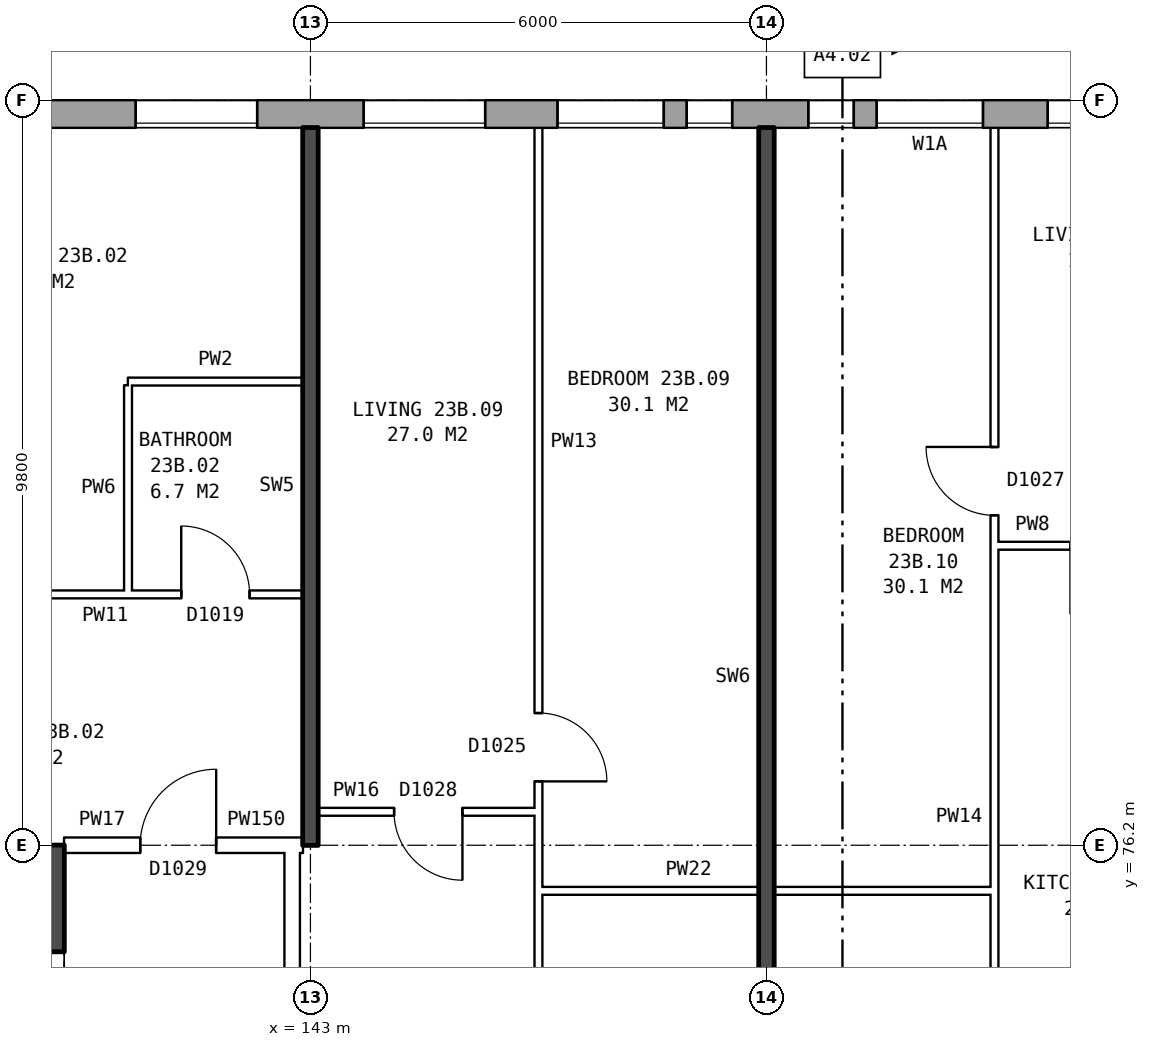
"""IFC4 building model, lengths in metres.
Left out: names, types, materials, properties, quantities, classifications, styles, units other than length and angle.
Written with IfcOpenShell. Run it as: python <this file> out.ifc"""

import sys

from ifc_helpers import new_model, si_unit, direction, frame, frame_2d, origin, place, context, subcontext, project, spatial, rectangle, extrude, element, fill, save


model = new_model("IFC4")
c1 = context("Model", 3, precision=1e-05, world=origin(), true_north=direction((0.0, 1.0)))
c2 = subcontext(c1, "Body", "Model", "MODEL_VIEW")
j1 = project(units=[si_unit("LENGTHUNIT", "METRE"), si_unit("PLANEANGLEUNIT", "RADIAN")], contexts=[c1])
p1 = place(None, origin())
s1 = spatial("IfcSite", under=j1, at=p1, CompositionType="ELEMENT")
p2 = place(p1, origin())
s2 = spatial("IfcBuilding", under=s1, at=p2, CompositionType="ELEMENT")
p3 = place(p2, frame((0.0, 0.0, 84.0)))
s3 = spatial("IfcBuildingStorey", under=s2, at=p3, CompositionType="ELEMENT", Elevation=84.0)
p4 = place(p3, frame((172.175, 85.82, 0.0), z_axis=(0.0, 0.0, 1.0), x_axis=(-1.0, 0.0, 0.0)))
e1 = element("IfcWall", 1, at=p4, inside=s3, PredefinedType="STANDARD", context=c2, shape_type="SweptSolid", body=[
    extrude(rectangle(XDim=38.101, YDim=0.36, at=frame_2d((19.05, 0.0))), origin(), (0.0, 0.0, 1.0), 2.85),
])
p5 = place(p4, frame((2.875, 0.0, 0.8)))
e2 = element("IfcOpeningElement", 2, at=p5, cuts=e1, PredefinedType="OPENING", context=c2, shape_type="SweptSolid", body=[
    extrude(rectangle(XDim=1.6, YDim=1.8, at=frame_2d((0.8, 0.9))), frame((0.0, 0.19, 0.0), z_axis=(0.0, -1.0, 0.0), x_axis=(1.0, 0.0, 0.0)), (0.0, 0.0, 1.0), 0.38),
])
p6 = place(p4, frame((5.875, 0.0, 0.8)))
e3 = element("IfcOpeningElement", 3, at=p6, cuts=e1, PredefinedType="OPENING", context=c2, shape_type="SweptSolid", body=[
    extrude(rectangle(XDim=1.6, YDim=1.8, at=frame_2d((0.8, 0.9))), frame((0.0, 0.19, 0.0), z_axis=(0.0, -1.0, 0.0), x_axis=(1.0, 0.0, 0.0)), (0.0, 0.0, 1.0), 0.38),
])
p7 = place(p4, frame((8.875, 0.0, 0.8)))
e4 = element("IfcOpeningElement", 4, at=p7, cuts=e1, PredefinedType="OPENING", context=c2, shape_type="SweptSolid", body=[
    extrude(rectangle(XDim=1.6, YDim=1.8, at=frame_2d((0.8, 0.9))), frame((0.0, 0.19, 0.0), z_axis=(0.0, -1.0, 0.0), x_axis=(1.0, 0.0, 0.0)), (0.0, 0.0, 1.0), 0.38),
])
p8 = place(p4, frame((11.875, 0.0, 0.8)))
e5 = element("IfcOpeningElement", 5, at=p8, cuts=e1, PredefinedType="OPENING", context=c2, shape_type="SweptSolid", body=[
    extrude(rectangle(XDim=1.6, YDim=1.8, at=frame_2d((0.8, 0.9))), frame((0.0, 0.19, 0.0), z_axis=(0.0, -1.0, 0.0), x_axis=(1.0, 0.0, 0.0)), (0.0, 0.0, 1.0), 0.38),
])
p9 = place(p4, frame((13.775, 0.0, 1.6)))
e6 = element("IfcOpeningElement", 6, at=p9, cuts=e1, PredefinedType="OPENING", context=c2, shape_type="SweptSolid", body=[
    extrude(rectangle(XDim=0.6, YDim=0.9, at=frame_2d((0.3, 0.45))), frame((0.0, 0.19, 0.0), z_axis=(0.0, -1.0, 0.0), x_axis=(1.0, 0.0, 0.0)), (0.0, 0.0, 1.0), 0.38),
])
p10 = place(p4, frame((17.875, 0.0, 0.8)))
e7 = element("IfcOpeningElement", 7, at=p10, cuts=e1, PredefinedType="OPENING", context=c2, shape_type="SweptSolid", body=[
    extrude(rectangle(XDim=1.6, YDim=1.8, at=frame_2d((0.8, 0.9))), frame((0.0, 0.19, 0.0), z_axis=(0.0, -1.0, 0.0), x_axis=(1.0, 0.0, 0.0)), (0.0, 0.0, 1.0), 0.38),
])
p11 = place(p4, frame((20.325, 0.0, 0.65)))
e8 = element("IfcOpeningElement", 8, at=p11, cuts=e1, PredefinedType="OPENING", context=c2, shape_type="SweptSolid", body=[
    extrude(rectangle(XDim=1.4, YDim=1.8, at=frame_2d((0.7, 0.9))), frame((0.0, 0.19, 0.0), z_axis=(0.0, -1.0, 0.0), x_axis=(1.0, 0.0, 0.0)), (0.0, 0.0, 1.0), 0.38),
])
p12 = place(p4, frame((23.625, 0.0, 1.7)))
e9 = element("IfcOpeningElement", 9, at=p12, cuts=e1, PredefinedType="OPENING", context=c2, shape_type="SweptSolid", body=[
    extrude(rectangle(XDim=0.6, YDim=0.9, at=frame_2d((0.3, 0.45))), frame((0.0, 0.19, 0.0), z_axis=(0.0, -1.0, 0.0), x_axis=(1.0, 0.0, 0.0)), (0.0, 0.0, 1.0), 0.38),
])
p13 = place(p4, frame((26.875, 0.0, 0.8)))
e10 = element("IfcOpeningElement", 10, at=p13, cuts=e1, PredefinedType="OPENING", context=c2, shape_type="SweptSolid", body=[
    extrude(rectangle(XDim=1.6, YDim=1.8, at=frame_2d((0.8, 0.9))), frame((0.0, 0.19, 0.0), z_axis=(0.0, -1.0, 0.0), x_axis=(1.0, 0.0, 0.0)), (0.0, 0.0, 1.0), 0.38),
])
p14 = place(p4, frame((29.875, 0.0, 0.8)))
e11 = element("IfcOpeningElement", 11, at=p14, cuts=e1, PredefinedType="OPENING", context=c2, shape_type="SweptSolid", body=[
    extrude(rectangle(XDim=1.6, YDim=1.8, at=frame_2d((0.8, 0.9))), frame((0.0, 0.19, 0.0), z_axis=(0.0, -1.0, 0.0), x_axis=(1.0, 0.0, 0.0)), (0.0, 0.0, 1.0), 0.38),
])
p15 = place(p4, frame((32.875, 0.0, 0.8)))
e12 = element("IfcOpeningElement", 12, at=p15, cuts=e1, PredefinedType="OPENING", context=c2, shape_type="SweptSolid", body=[
    extrude(rectangle(XDim=1.6, YDim=1.8, at=frame_2d((0.8, 0.9))), frame((0.0, 0.19, 0.0), z_axis=(0.0, -1.0, 0.0), x_axis=(1.0, 0.0, 0.0)), (0.0, 0.0, 1.0), 0.38),
])
p16 = place(p4, frame((35.875, 0.0, 0.8)))
e13 = element("IfcOpeningElement", 13, at=p16, cuts=e1, PredefinedType="OPENING", context=c2, shape_type="SweptSolid", body=[
    extrude(rectangle(XDim=1.6, YDim=1.8, at=frame_2d((0.8, 0.9))), frame((0.0, 0.19, 0.0), z_axis=(0.0, -1.0, 0.0), x_axis=(1.0, 0.0, 0.0)), (0.0, 0.0, 1.0), 0.38),
])
p17 = place(p4, frame((15.925, 0.0, 0.8)))
e14 = element("IfcOpeningElement", 14, at=p17, cuts=e1, PredefinedType="OPENING", context=c2, shape_type="SweptSolid", body=[
    extrude(rectangle(XDim=1.0, YDim=1.2, at=frame_2d((0.5, 0.6))), frame((0.0, 0.19, 0.0), z_axis=(0.0, -1.0, 0.0), x_axis=(1.0, 0.0, 0.0)), (0.0, 0.0, 1.0), 0.38),
])
p18 = place(p4, frame((22.025, 0.0, 0.65)))
e15 = element("IfcOpeningElement", 15, at=p18, cuts=e1, PredefinedType="OPENING", context=c2, shape_type="SweptSolid", body=[
    extrude(rectangle(XDim=0.6, YDim=0.9, at=frame_2d((0.3, 0.45))), frame((0.0, 0.19, 0.0), z_axis=(0.0, -1.0, 0.0), x_axis=(1.0, 0.0, 0.0)), (0.0, 0.0, 1.0), 0.38),
])
p19 = place(p4, frame((24.525, 0.0, 0.8)))
e16 = element("IfcOpeningElement", 16, at=p19, cuts=e1, PredefinedType="OPENING", context=c2, shape_type="SweptSolid", body=[
    extrude(rectangle(XDim=1.4, YDim=1.8, at=frame_2d((0.7, 0.9))), frame((0.0, 0.19, 0.0), z_axis=(0.0, -1.0, 0.0), x_axis=(1.0, 0.0, 0.0)), (0.0, 0.0, 1.0), 0.38),
])
p20 = place(p3, frame((139.41, 64.5, 0.0), z_axis=(0.0, 0.0, 1.0), x_axis=(0.0, 1.0, 0.0)))
e17 = element("IfcWall", 17, at=p20, inside=s3, PredefinedType="SHEAR", context=c2, shape_type="SweptSolid", body=[
    extrude(rectangle(XDim=11.0, YDim=0.7, at=frame_2d((5.5, 0.0))), origin(), (0.0, 0.0, 1.0), 2.85),
])
p21 = place(p20, frame((0.625, 0.0, 0.0)))
e18 = element("IfcOpeningElement", 18, at=p21, cuts=e17, PredefinedType="OPENING", context=c2, shape_type="SweptSolid", body=[
    extrude(rectangle(XDim=1.1, YDim=2.1, at=frame_2d((0.55, 1.05))), frame((0.0, 0.36, 0.0), z_axis=(0.0, -1.0, 0.0), x_axis=(1.0, 0.0, 0.0)), (0.0, 0.0, 1.0), 0.72),
])
p22 = place(p20, frame((9.2, 0.0, 0.0)))
e19 = element("IfcOpeningElement", 19, at=p22, cuts=e17, PredefinedType="OPENING", context=c2, shape_type="SweptSolid", body=[
    extrude(rectangle(XDim=1.1, YDim=2.1, at=frame_2d((0.55, 1.05))), frame((0.0, 0.36, 0.0), z_axis=(0.0, -1.0, 0.0), x_axis=(1.0, 0.0, 0.0)), (0.0, 0.0, 1.0), 0.72),
])
p23 = place(p20, frame((7.425, 0.0, 0.0)))
e20 = element("IfcOpeningElement", 20, at=p23, cuts=e17, PredefinedType="OPENING", context=c2, shape_type="SweptSolid", body=[
    extrude(rectangle(XDim=0.85, YDim=2.1, at=frame_2d((0.425, 1.05))), frame((0.0, 0.36, 0.0), z_axis=(0.0, -1.0, 0.0), x_axis=(1.0, 0.0, 0.0)), (0.0, 0.0, 1.0), 0.72),
])
p24 = place(p3, frame((139.76, 75.85, 0.0), z_axis=(0.0, 0.0, 1.0), x_axis=(-1.0, 0.0, 0.0)))
e21 = element("IfcWall", 21, at=p24, inside=s3, PredefinedType="SHEAR", context=c2, shape_type="SweptSolid", body=[
    extrude(rectangle(XDim=8.4, YDim=0.7, at=frame_2d((4.2, 0.0))), origin(), (0.0, 0.0, 1.0), 2.85),
])
p25 = place(p3, frame((142.76, 63.9, 0.0), z_axis=(0.0, 0.0, 1.0), x_axis=(0.0, 1.0, 0.0)))
e22 = element("IfcWall", 22, at=p25, inside=s3, PredefinedType="PARTITIONING", context=c2, shape_type="SweptSolid", body=[
    extrude(rectangle(XDim=12.2, YDim=0.2, at=frame_2d((6.1, 0.0))), origin(), (0.0, 0.0, 1.0), 2.85),
])
p26 = place(p25, frame((5.1, 0.0, 0.0)))
e23 = element("IfcOpeningElement", 23, at=p26, cuts=e22, PredefinedType="OPENING", context=c2, shape_type="SweptSolid", body=[
    extrude(rectangle(XDim=2.0, YDim=2.1, at=frame_2d((1.0, 1.05))), frame((0.0, 0.11, 0.0), z_axis=(0.0, -1.0, 0.0), x_axis=(1.0, 0.0, 0.0)), (0.0, 0.0, 1.0), 0.22),
])
p27 = place(p3, frame((146.0, 75.6, 0.0), z_axis=(0.0, 0.0, 1.0), x_axis=(1.0, 0.0, 0.0)))
e24 = element("IfcWall", 24, at=p27, inside=s3, PredefinedType="PARTITIONING", context=c2, shape_type="SweptSolid", body=[
    extrude(rectangle(XDim=6.0, YDim=0.1, at=frame_2d((3.0, 0.0))), origin(), (0.0, 0.0, 1.0), 2.85),
])
p28 = place(p3, frame((139.76, 76.2, 0.0), z_axis=(0.0, 0.0, 1.0), x_axis=(1.0, 0.0, 0.0)))
e25 = element("IfcWall", 25, at=p28, inside=s3, PredefinedType="PARTITIONING", context=c2, shape_type="SweptSolid", body=[
    extrude(rectangle(XDim=3.0, YDim=0.2, at=frame_2d((1.5, 0.0))), origin(), (0.0, 0.0, 1.0), 2.85),
])
p29 = place(p28, frame((1.0, 0.0, 0.0)))
e26 = element("IfcOpeningElement", 26, at=p29, cuts=e25, PredefinedType="OPENING", context=c2, shape_type="SweptSolid", body=[
    extrude(rectangle(XDim=1.0, YDim=2.1, at=frame_2d((0.5, 1.05))), frame((0.0, 0.11, 0.0), z_axis=(0.0, -1.0, 0.0), x_axis=(1.0, 0.0, 0.0)), (0.0, 0.0, 1.0), 0.22),
])
p30 = place(p3, frame((142.76, 76.2, 0.0), z_axis=(0.0, 0.0, 1.0), x_axis=(1.0, 0.0, 0.0)))
e27 = element("IfcWall", 27, at=p30, inside=s3, PredefinedType="PARTITIONING", context=c2, shape_type="SweptSolid", body=[
    extrude(rectangle(XDim=0.14, YDim=0.2, at=frame_2d((0.07, 0.0))), origin(), (0.0, 0.0, 1.0), 2.85),
])
p31 = place(p3, frame((143.1, 76.64, 0.0), z_axis=(0.0, 0.0, 1.0), x_axis=(1.0, 0.0, 0.0)))
e28 = element("IfcWall", 28, at=p31, inside=s3, PredefinedType="PARTITIONING", context=c2, shape_type="SweptSolid", body=[
    extrude(rectangle(XDim=2.9, YDim=0.1, at=frame_2d((1.45, 0.0))), origin(), (0.0, 0.0, 1.0), 2.85),
])
p32 = place(p31, frame((1.0, 0.0, 0.0)))
e29 = element("IfcOpeningElement", 29, at=p32, cuts=e28, PredefinedType="OPENING", context=c2, shape_type="SweptSolid", body=[
    extrude(rectangle(XDim=0.9, YDim=2.1, at=frame_2d((0.45, 1.05))), frame((0.0, 0.06, 0.0), z_axis=(0.0, -1.0, 0.0), x_axis=(1.0, 0.0, 0.0)), (0.0, 0.0, 1.0), 0.12),
])
p33 = place(p3, frame((137.1, 79.5, 0.0), z_axis=(0.0, 0.0, 1.0), x_axis=(1.0, 0.0, 0.0)))
e30 = element("IfcWall", 30, at=p33, inside=s3, PredefinedType="PARTITIONING", context=c2, shape_type="SweptSolid", body=[
    extrude(rectangle(XDim=5.8, YDim=0.1, at=frame_2d((2.9, 0.0))), origin(), (0.0, 0.0, 1.0), 2.85),
])
p34 = place(p33, frame((1.3, 0.0, 0.0)))
e31 = element("IfcOpeningElement", 31, at=p34, cuts=e30, PredefinedType="OPENING", context=c2, shape_type="SweptSolid", body=[
    extrude(rectangle(XDim=0.9, YDim=2.1, at=frame_2d((0.45, 1.05))), frame((0.0, 0.06, 0.0), z_axis=(0.0, -1.0, 0.0), x_axis=(1.0, 0.0, 0.0)), (0.0, 0.0, 1.0), 0.12),
])
p35 = place(p33, frame((4.2, 0.0, 0.0)))
e32 = element("IfcOpeningElement", 32, at=p35, cuts=e30, PredefinedType="OPENING", context=c2, shape_type="SweptSolid", body=[
    extrude(rectangle(XDim=0.9, YDim=2.1, at=frame_2d((0.45, 1.05))), frame((0.0, 0.06, 0.0), z_axis=(0.0, -1.0, 0.0), x_axis=(1.0, 0.0, 0.0)), (0.0, 0.0, 1.0), 0.12),
])
p36 = place(p3, frame((152.0, 80.14, 0.0), z_axis=(0.0, 0.0, 1.0), x_axis=(1.0, 0.0, 0.0)))
e33 = element("IfcWall", 33, at=p36, inside=s3, PredefinedType="PARTITIONING", context=c2, shape_type="SweptSolid", body=[
    extrude(rectangle(XDim=2.9, YDim=0.1, at=frame_2d((1.45, 0.0))), origin(), (0.0, 0.0, 1.0), 2.85),
])
p37 = place(p36, frame((1.0, 0.0, 0.0)))
e34 = element("IfcOpeningElement", 34, at=p37, cuts=e33, PredefinedType="OPENING", context=c2, shape_type="SweptSolid", body=[
    extrude(rectangle(XDim=0.9, YDim=2.1, at=frame_2d((0.45, 1.05))), frame((0.0, 0.06, 0.0), z_axis=(0.0, -1.0, 0.0), x_axis=(1.0, 0.0, 0.0)), (0.0, 0.0, 1.0), 0.12),
])
p38 = place(p3, frame((140.6, 82.3, 0.0), z_axis=(0.0, 0.0, 1.0), x_axis=(1.0, 0.0, 0.0)))
e35 = element("IfcWall", 35, at=p38, inside=s3, PredefinedType="PARTITIONING", context=c2, shape_type="SweptSolid", body=[
    extrude(rectangle(XDim=2.3, YDim=0.1, at=frame_2d((1.15, 0.0))), origin(), (0.0, 0.0, 1.0), 2.85),
])
p39 = place(p3, frame((140.6, 79.55, 0.0), z_axis=(0.0, 0.0, 1.0), x_axis=(0.0, 1.0, 0.0)))
e36 = element("IfcWall", 36, at=p39, inside=s3, PredefinedType="PARTITIONING", context=c2, shape_type="SweptSolid", body=[
    extrude(rectangle(XDim=2.7, YDim=0.1, at=frame_2d((1.35, 0.0))), origin(), (0.0, 0.0, 1.0), 2.85),
])
p40 = place(p3, frame((143.0, 76.2, 0.0), z_axis=(0.0, 0.0, 1.0), x_axis=(0.0, 1.0, 0.0)))
e37 = element("IfcWall", 37, at=p40, inside=s3, PredefinedType="SOLIDWALL", context=c2, shape_type="SweptSolid", body=[
    extrude(rectangle(XDim=9.44, YDim=0.2, at=frame_2d((4.72, 0.0))), origin(), (0.0, 0.0, 1.0), 2.85),
])
p41 = place(p3, frame((146.0, 71.3, 0.0), z_axis=(0.0, 0.0, 1.0), x_axis=(0.0, 1.0, 0.0)))
e38 = element("IfcWall", 38, at=p41, inside=s3, PredefinedType="PARTITIONING", context=c2, shape_type="SweptSolid", body=[
    extrude(rectangle(XDim=14.34, YDim=0.1, at=frame_2d((7.17, 0.0))), origin(), (0.0, 0.0, 1.0), 2.85),
])
p42 = place(p41, frame((5.74, 0.0, 0.0)))
e39 = element("IfcOpeningElement", 39, at=p42, cuts=e38, PredefinedType="OPENING", context=c2, shape_type="SweptSolid", body=[
    extrude(rectangle(XDim=0.9, YDim=2.1, at=frame_2d((0.45, 1.05))), frame((0.0, 0.06, 0.0), z_axis=(0.0, -1.0, 0.0), x_axis=(1.0, 0.0, 0.0)), (0.0, 0.0, 1.0), 0.12),
])
p43 = place(p41, frame((0.4, 0.0, 0.0)))
e40 = element("IfcOpeningElement", 40, at=p43, cuts=e38, PredefinedType="OPENING", context=c2, shape_type="SweptSolid", body=[
    extrude(rectangle(XDim=0.9, YDim=2.1, at=frame_2d((0.45, 1.05))), frame((0.0, 0.06, 0.0), z_axis=(0.0, -1.0, 0.0), x_axis=(1.0, 0.0, 0.0)), (0.0, 0.0, 1.0), 0.12),
])
p44 = place(p3, frame((149.0, 71.2, 0.0), z_axis=(0.0, 0.0, 1.0), x_axis=(0.0, 1.0, 0.0)))
e41 = element("IfcWall", 41, at=p44, inside=s3, PredefinedType="SOLIDWALL", context=c2, shape_type="SweptSolid", body=[
    extrude(rectangle(XDim=14.44, YDim=0.2, at=frame_2d((7.22, 0.0))), origin(), (0.0, 0.0, 1.0), 2.85),
])
p45 = place(p3, frame((152.0, 71.3, 0.0), z_axis=(0.0, 0.0, 1.0), x_axis=(0.0, 1.0, 0.0)))
e42 = element("IfcWall", 42, at=p45, inside=s3, PredefinedType="PARTITIONING", context=c2, shape_type="SweptSolid", body=[
    extrude(rectangle(XDim=14.34, YDim=0.1, at=frame_2d((7.17, 0.0))), origin(), (0.0, 0.0, 1.0), 2.85),
])
p46 = place(p45, frame((9.24, 0.0, 0.0)))
e43 = element("IfcOpeningElement", 43, at=p46, cuts=e42, PredefinedType="OPENING", context=c2, shape_type="SweptSolid", body=[
    extrude(rectangle(XDim=0.9, YDim=2.1, at=frame_2d((0.45, 1.05))), frame((0.0, 0.06, 0.0), z_axis=(0.0, -1.0, 0.0), x_axis=(1.0, 0.0, 0.0)), (0.0, 0.0, 1.0), 0.12),
])
p47 = place(p45, frame((0.4, 0.0, 0.0)))
e44 = element("IfcOpeningElement", 44, at=p47, cuts=e42, PredefinedType="OPENING", context=c2, shape_type="SweptSolid", body=[
    extrude(rectangle(XDim=0.9, YDim=2.1, at=frame_2d((0.45, 1.05))), frame((0.0, 0.06, 0.0), z_axis=(0.0, -1.0, 0.0), x_axis=(1.0, 0.0, 0.0)), (0.0, 0.0, 1.0), 0.12),
])
p48 = place(p10, origin())
e45 = element("IfcWindow", 45, at=p48, inside=s3, PartitioningType="SINGLE_PANEL", PredefinedType="WINDOW", context=c2, shape_type="SweptSolid", body=[
    extrude(rectangle(XDim=1.6, YDim=1.8, at=frame_2d((0.8, 0.9))), frame((0.0, 0.15, 0.0), z_axis=(0.0, -1.0, 0.0), x_axis=(1.0, 0.0, 0.0)), (0.0, 0.0, 1.0), 0.06),
])
fill(e7, e45)
p49 = place(p11, origin())
e46 = element("IfcWindow", 46, at=p49, inside=s3, PartitioningType="SINGLE_PANEL", PredefinedType="WINDOW", context=c2, shape_type="SweptSolid", body=[
    extrude(rectangle(XDim=1.4, YDim=1.8, at=frame_2d((0.7, 0.9))), frame((0.0, 0.15, 0.0), z_axis=(0.0, -1.0, 0.0), x_axis=(1.0, 0.0, 0.0)), (0.0, 0.0, 1.0), 0.06),
])
fill(e8, e46)
p50 = place(p12, origin())
e47 = element("IfcWindow", 47, at=p50, inside=s3, PartitioningType="SINGLE_PANEL", PredefinedType="WINDOW", context=c2, shape_type="SweptSolid", body=[
    extrude(rectangle(XDim=0.6, YDim=0.9, at=frame_2d((0.3, 0.45))), frame((0.0, 0.15, 0.0), z_axis=(0.0, -1.0, 0.0), x_axis=(1.0, 0.0, 0.0)), (0.0, 0.0, 1.0), 0.06),
])
fill(e9, e47)
p51 = place(p13, origin())
e48 = element("IfcWindow", 48, at=p51, inside=s3, PartitioningType="SINGLE_PANEL", PredefinedType="WINDOW", context=c2, shape_type="SweptSolid", body=[
    extrude(rectangle(XDim=1.6, YDim=1.8, at=frame_2d((0.8, 0.9))), frame((0.0, 0.15, 0.0), z_axis=(0.0, -1.0, 0.0), x_axis=(1.0, 0.0, 0.0)), (0.0, 0.0, 1.0), 0.06),
])
fill(e10, e48)
p52 = place(p14, origin())
e49 = element("IfcWindow", 49, at=p52, inside=s3, PartitioningType="SINGLE_PANEL", PredefinedType="WINDOW", context=c2, shape_type="SweptSolid", body=[
    extrude(rectangle(XDim=1.6, YDim=1.8, at=frame_2d((0.8, 0.9))), frame((0.0, 0.15, 0.0), z_axis=(0.0, -1.0, 0.0), x_axis=(1.0, 0.0, 0.0)), (0.0, 0.0, 1.0), 0.06),
])
fill(e11, e49)
p53 = place(p29, origin())
e50 = element("IfcDoor", 50, at=p53, inside=s3, OperationType="SINGLE_SWING_RIGHT", PredefinedType="DOOR", context=c2, shape_type="SweptSolid", body=[
    extrude(rectangle(XDim=1.0, YDim=2.1, at=frame_2d((0.5, 1.05))), frame((0.0, 0.025, 0.0), z_axis=(0.0, -1.0, 0.0), x_axis=(1.0, 0.0, 0.0)), (0.0, 0.0, 1.0), 0.05),
])
fill(e26, e50)
p54 = place(p35, origin())
e51 = element("IfcDoor", 51, at=p54, inside=s3, OperationType="SINGLE_SWING_LEFT", PredefinedType="DOOR", context=c2, shape_type="SweptSolid", body=[
    extrude(rectangle(XDim=0.9, YDim=2.1, at=frame_2d((0.45, 1.05))), frame((0.0, 0.025, 0.0), z_axis=(0.0, -1.0, 0.0), x_axis=(1.0, 0.0, 0.0)), (0.0, 0.0, 1.0), 0.05),
])
fill(e32, e51)
p55 = place(p42, frame((0.9, 0.0, 0.0), z_axis=(0.0, 0.0, 1.0), x_axis=(-1.0, 0.0, 0.0)))
e52 = element("IfcDoor", 52, at=p55, inside=s3, OperationType="SINGLE_SWING_RIGHT", PredefinedType="DOOR", context=c2, shape_type="SweptSolid", body=[
    extrude(rectangle(XDim=0.9, YDim=2.1, at=frame_2d((0.45, 1.05))), frame((0.0, 0.025, 0.0), z_axis=(0.0, -1.0, 0.0), x_axis=(1.0, 0.0, 0.0)), (0.0, 0.0, 1.0), 0.05),
])
fill(e39, e52)
p56 = place(p32, frame((0.9, 0.0, 0.0), z_axis=(0.0, 0.0, 1.0), x_axis=(-1.0, 0.0, 0.0)))
e53 = element("IfcDoor", 53, at=p56, inside=s3, OperationType="SINGLE_SWING_LEFT", PredefinedType="DOOR", context=c2, shape_type="SweptSolid", body=[
    extrude(rectangle(XDim=0.9, YDim=2.1, at=frame_2d((0.45, 1.05))), frame((0.0, 0.025, 0.0), z_axis=(0.0, -1.0, 0.0), x_axis=(1.0, 0.0, 0.0)), (0.0, 0.0, 1.0), 0.05),
])
fill(e29, e53)
p57 = place(p46, origin())
e54 = element("IfcDoor", 54, at=p57, inside=s3, OperationType="SINGLE_SWING_RIGHT", PredefinedType="DOOR", context=c2, shape_type="SweptSolid", body=[
    extrude(rectangle(XDim=0.9, YDim=2.1, at=frame_2d((0.45, 1.05))), frame((0.0, 0.025, 0.0), z_axis=(0.0, -1.0, 0.0), x_axis=(1.0, 0.0, 0.0)), (0.0, 0.0, 1.0), 0.05),
])
fill(e43, e54)
p58 = place(p18, origin())
e55 = element("IfcWindow", 55, at=p58, inside=s3, PartitioningType="SINGLE_PANEL", PredefinedType="WINDOW", context=c2, shape_type="SweptSolid", body=[
    extrude(rectangle(XDim=0.6, YDim=0.9, at=frame_2d((0.3, 0.45))), frame((0.0, 0.15, 0.0), z_axis=(0.0, -1.0, 0.0), x_axis=(1.0, 0.0, 0.0)), (0.0, 0.0, 1.0), 0.06),
])
fill(e15, e55)
p59 = place(p19, origin())
e56 = element("IfcWindow", 56, at=p59, inside=s3, PartitioningType="SINGLE_PANEL", PredefinedType="WINDOW", context=c2, shape_type="SweptSolid", body=[
    extrude(rectangle(XDim=1.4, YDim=1.8, at=frame_2d((0.7, 0.9))), frame((0.0, 0.15, 0.0), z_axis=(0.0, -1.0, 0.0), x_axis=(1.0, 0.0, 0.0)), (0.0, 0.0, 1.0), 0.06),
])
fill(e16, e56)
save(model, sys.argv[1])
